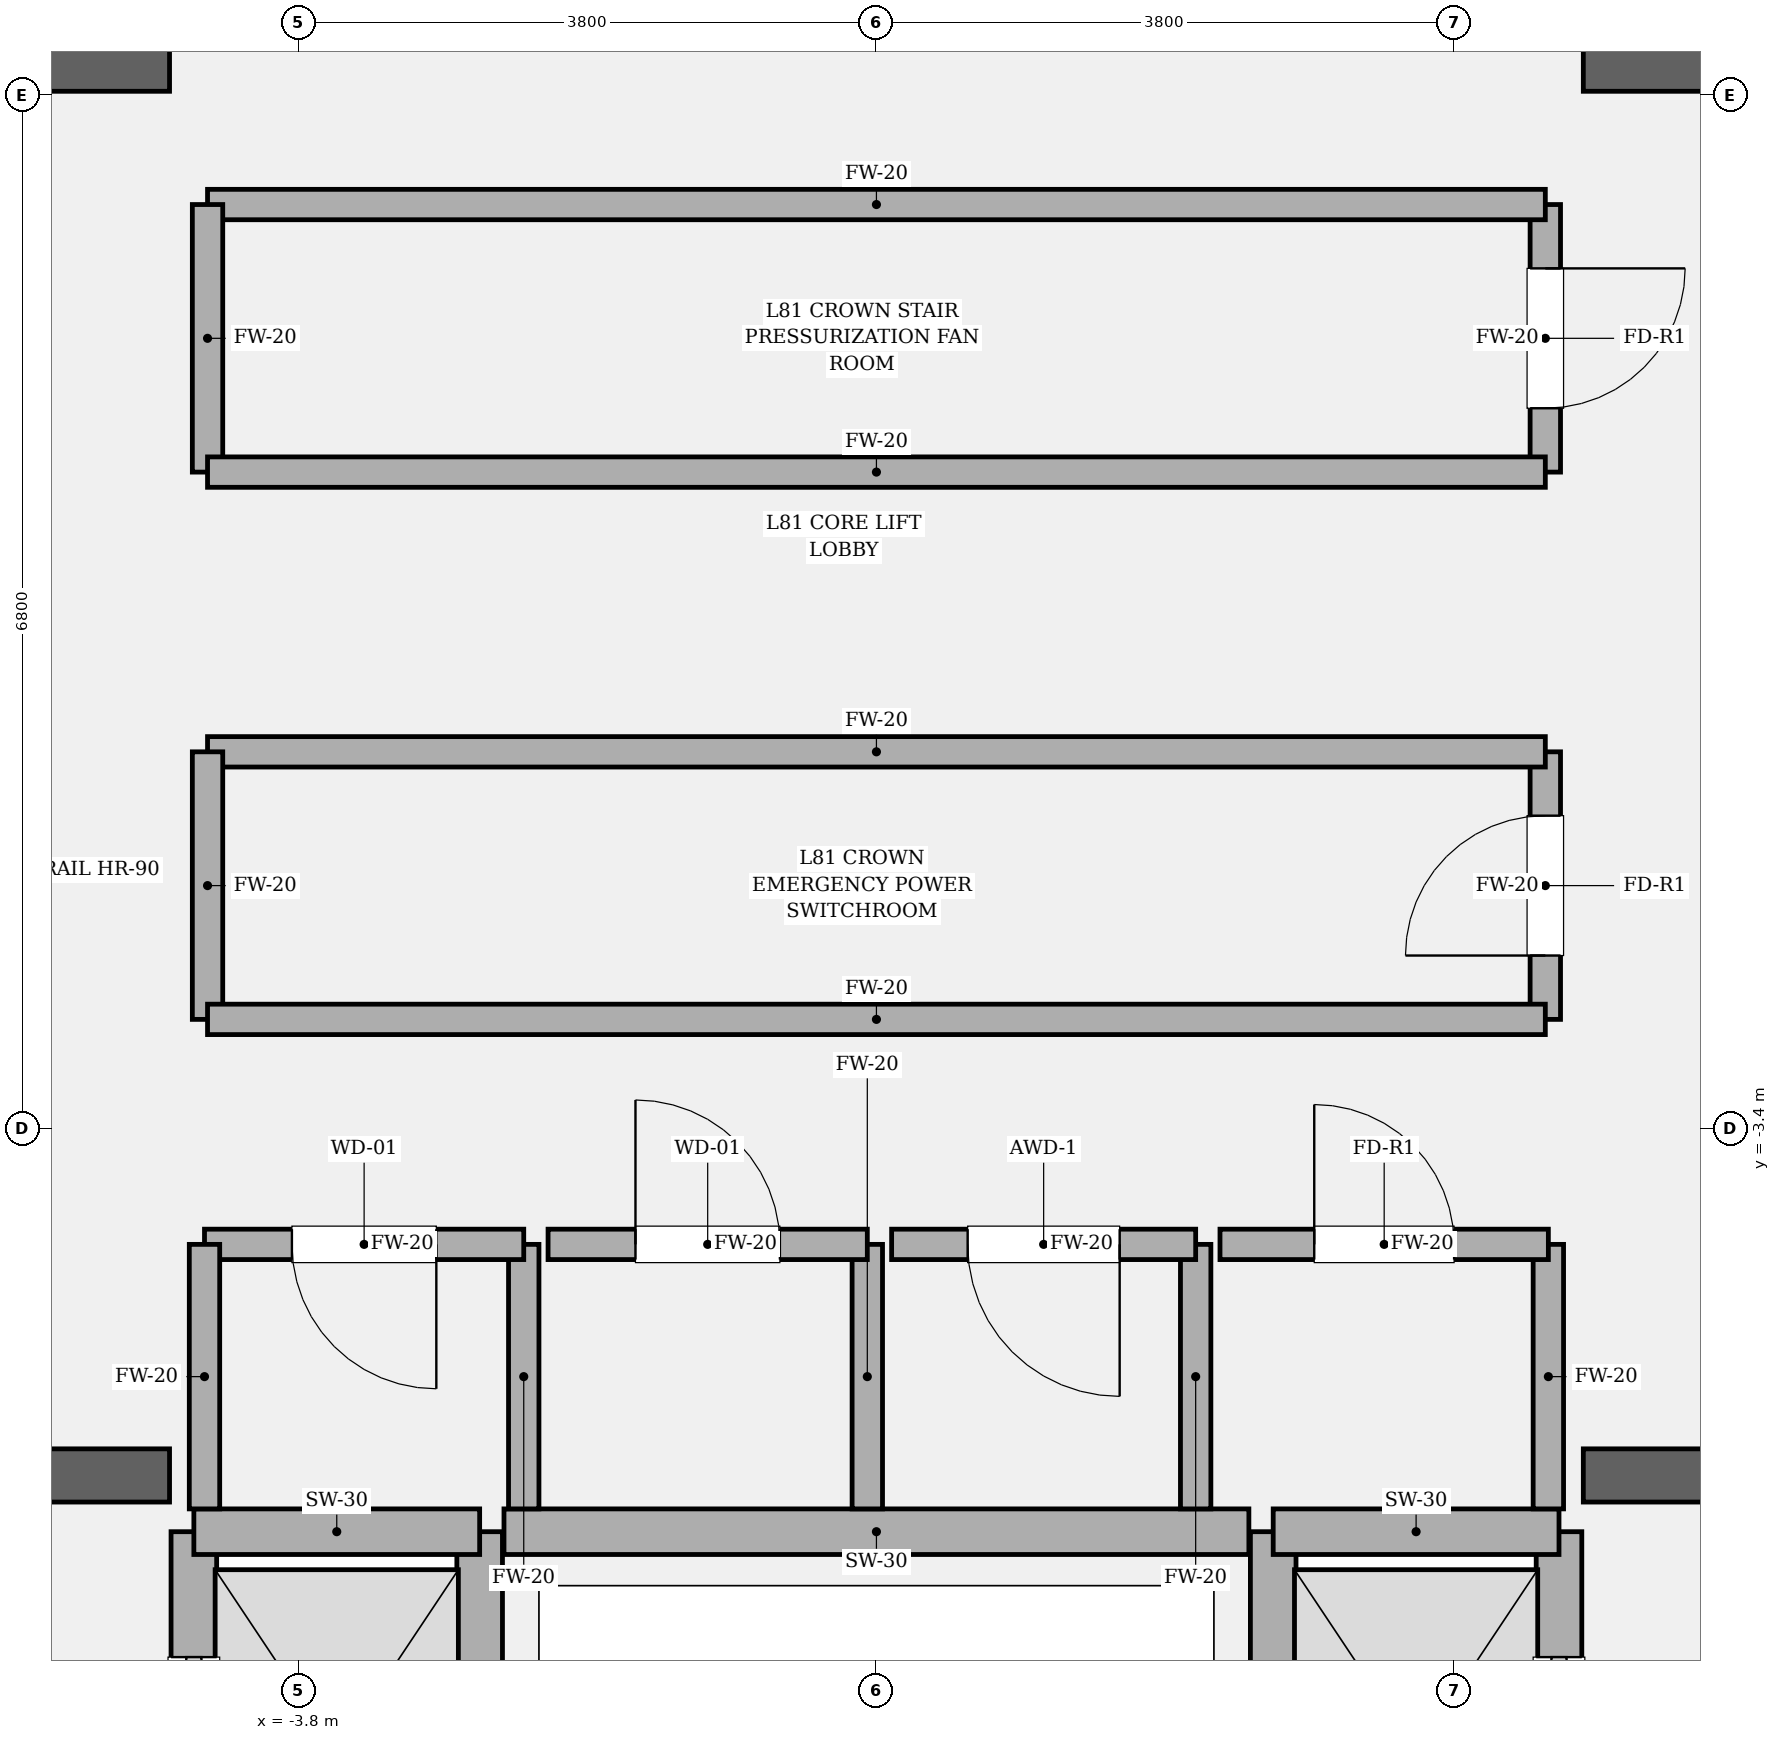
"""IFC4 building model, lengths in metres.
Left out: names, types, materials, properties, quantities, classifications, styles, units other than length and angle.
Written with IfcOpenShell. Run it as: python <this file> out.ifc"""

import sys

from ifc_helpers import new_model, si_unit, direction, frame, frame_2d, origin, place, context, subcontext, project, spatial, rectangle, extrude, element, fill, save


model = new_model("IFC4")
c1 = context("Model", 3, precision=1e-05, world=origin(), true_north=direction((0.0, 1.0)))
c2 = subcontext(c1, "Body", "Model", "MODEL_VIEW")
j1 = project(units=[si_unit("LENGTHUNIT", "METRE"), si_unit("PLANEANGLEUNIT", "RADIAN")], contexts=[c1])
p1 = place(None, origin())
s1 = spatial("IfcSite", under=j1, at=p1, CompositionType="ELEMENT")
p2 = place(p1, origin())
s2 = spatial("IfcBuilding", under=s1, at=p2, CompositionType="ELEMENT")
p3 = place(p2, frame((0.0, 0.0, 343.8)))
s3 = spatial("IfcBuildingStorey", under=s2, at=p3, CompositionType="ELEMENT", Elevation=343.8)
p4 = place(p3, frame((-9.975, -5.68, 0.0), z_axis=(0.0, 0.0, 1.0), x_axis=(1.0, 0.0, 0.0)))
e1 = element("IfcWall", 1, at=p4, inside=s3, PredefinedType="SOLIDWALL", context=c2, shape_type="SweptSolid", body=[
    extrude(rectangle(XDim=5.325, YDim=0.35, at=frame_2d((2.663, 0.0))), origin(), (0.0, 0.0, 1.0), 4.5),
])
p5 = place(p4, frame((1.435, 0.0, 0.0)))
e2 = element("IfcOpeningElement", 2, at=p5, cuts=e1, PredefinedType="OPENING", context=c2, shape_type="SweptSolid", body=[
    extrude(rectangle(XDim=1.18, YDim=2.2, at=frame_2d((0.59, 1.1))), frame((0.0, 0.185, 0.0), z_axis=(0.0, -1.0, 0.0), x_axis=(1.0, 0.0, 0.0)), (0.0, 0.0, 1.0), 0.37),
])
p6 = place(p3, frame((4.65, -5.68, 0.0), z_axis=(0.0, 0.0, 1.0), x_axis=(1.0, 0.0, 0.0)))
e3 = element("IfcWall", 3, at=p6, inside=s3, PredefinedType="SOLIDWALL", context=c2, shape_type="SweptSolid", body=[
    extrude(rectangle(XDim=5.325, YDim=0.35, at=frame_2d((2.663, 0.0))), origin(), (0.0, 0.0, 1.0), 4.5),
])
p7 = place(p6, frame((2.71, 0.0, 0.0)))
e4 = element("IfcOpeningElement", 4, at=p7, cuts=e3, PredefinedType="OPENING", context=c2, shape_type="SweptSolid", body=[
    extrude(rectangle(XDim=1.18, YDim=2.2, at=frame_2d((0.59, 1.1))), frame((0.0, 0.185, 0.0), z_axis=(0.0, -1.0, 0.0), x_axis=(1.0, 0.0, 0.0)), (0.0, 0.0, 1.0), 0.37),
])
for number, where, z_axis, x_axis in (
    (5, (-9.975, 3.6, 0.0), (0.0, 0.0, 1.0), (1.0, 0.0, 0.0)),
    (6, (4.65, 3.6, 0.0), (0.0, 0.0, 1.0), (1.0, 0.0, 0.0)),
):
    element("IfcWall", number, at=place(p3, frame(where, z_axis=z_axis, x_axis=x_axis)), inside=s3, PredefinedType="SOLIDWALL", context=c2, shape_type="SweptSolid", body=[
        extrude(rectangle(XDim=5.325, YDim=0.35, at=frame_2d((2.663, 0.0))), origin(), (0.0, 0.0, 1.0), 4.5),
    ])
p8 = place(p3, frame((-4.49, -8.82, 0.0), z_axis=(0.0, 0.0, 1.0), x_axis=(0.0, 1.0, 0.0)))
e7 = element("IfcWall", 7, at=p8, inside=s3, PredefinedType="SOLIDWALL", context=c2, shape_type="SweptSolid", body=[
    extrude(rectangle(XDim=2.77, YDim=0.3, at=frame_2d((1.385, 0.0))), origin(), (0.0, 0.0, 1.0), 4.28),
])
p9 = place(p8, frame((0.825, 0.0, 0.0)))
e8 = element("IfcOpeningElement", 8, at=p9, cuts=e7, PredefinedType="OPENING", context=c2, shape_type="SweptSolid", body=[
    extrude(rectangle(XDim=1.12, YDim=2.25, at=frame_2d((0.56, 1.125))), frame((0.0, 0.16, 0.0), z_axis=(0.0, -1.0, 0.0), x_axis=(1.0, 0.0, 0.0)), (0.0, 0.0, 1.0), 0.32),
])
p10 = place(p3, frame((-2.61, -8.82, 0.0), z_axis=(0.0, 0.0, 1.0), x_axis=(0.0, 1.0, 0.0)))
e9 = element("IfcWall", 9, at=p10, inside=s3, PredefinedType="SOLIDWALL", context=c2, shape_type="SweptSolid", body=[
    extrude(rectangle(XDim=2.77, YDim=0.3, at=frame_2d((1.385, 0.0))), origin(), (0.0, 0.0, 1.0), 4.28),
])
p11 = place(p3, frame((-4.49, -6.05, 0.0), z_axis=(0.0, 0.0, 1.0), x_axis=(1.0, 0.0, 0.0)))
e10 = element("IfcWall", 10, at=p11, inside=s3, PredefinedType="SOLIDWALL", context=c2, shape_type="SweptSolid", body=[
    extrude(rectangle(XDim=1.88, YDim=0.3, at=frame_2d((0.94, 0.0))), origin(), (0.0, 0.0, 1.0), 4.28),
])
p12 = place(p3, frame((4.49, -8.82, 0.0), z_axis=(0.0, 0.0, 1.0), x_axis=(0.0, 1.0, 0.0)))
e11 = element("IfcWall", 11, at=p12, inside=s3, PredefinedType="SOLIDWALL", context=c2, shape_type="SweptSolid", body=[
    extrude(rectangle(XDim=2.77, YDim=0.3, at=frame_2d((1.385, 0.0))), origin(), (0.0, 0.0, 1.0), 4.28),
])
p13 = place(p12, frame((0.825, 0.0, 0.0)))
e12 = element("IfcOpeningElement", 12, at=p13, cuts=e11, PredefinedType="OPENING", context=c2, shape_type="SweptSolid", body=[
    extrude(rectangle(XDim=1.12, YDim=2.25, at=frame_2d((0.56, 1.125))), frame((0.0, 0.16, 0.0), z_axis=(0.0, -1.0, 0.0), x_axis=(1.0, 0.0, 0.0)), (0.0, 0.0, 1.0), 0.32),
])
p14 = place(p3, frame((2.61, -8.82, 0.0), z_axis=(0.0, 0.0, 1.0), x_axis=(0.0, 1.0, 0.0)))
e13 = element("IfcWall", 13, at=p14, inside=s3, PredefinedType="SOLIDWALL", context=c2, shape_type="SweptSolid", body=[
    extrude(rectangle(XDim=2.77, YDim=0.3, at=frame_2d((1.385, 0.0))), origin(), (0.0, 0.0, 1.0), 4.28),
])
p15 = place(p3, frame((2.61, -6.05, 0.0), z_axis=(0.0, 0.0, 1.0), x_axis=(1.0, 0.0, 0.0)))
e14 = element("IfcWall", 14, at=p15, inside=s3, PredefinedType="SOLIDWALL", context=c2, shape_type="SweptSolid", body=[
    extrude(rectangle(XDim=1.88, YDim=0.3, at=frame_2d((0.94, 0.0))), origin(), (0.0, 0.0, 1.0), 4.28),
])
p16 = place(p3, frame((-2.45, -6.05, 0.0), z_axis=(0.0, 0.0, 1.0), x_axis=(1.0, 0.0, 0.0)))
e15 = element("IfcWall", 15, at=p16, inside=s3, PredefinedType="SOLIDWALL", context=c2, shape_type="SweptSolid", body=[
    extrude(rectangle(XDim=4.9, YDim=0.3, at=frame_2d((2.45, 0.0))), origin(), (0.0, 0.0, 1.0), 4.28),
])
p17 = place(p3, frame((-2.32, -5.9, 0.0), z_axis=(0.0, 0.0, 1.0), x_axis=(0.0, 1.0, 0.0)))
e16 = element("IfcWall", 16, at=p17, inside=s3, PredefinedType="SOLIDWALL", context=c2, shape_type="SweptSolid", body=[
    extrude(rectangle(XDim=1.74, YDim=0.2, at=frame_2d((0.87, 0.0))), origin(), (0.0, 0.0, 1.0), 4.28),
])
p18 = place(p3, frame((-2.32, -4.16, 0.0), z_axis=(0.0, 0.0, 1.0), x_axis=(-1.0, 0.0, 0.0)))
e17 = element("IfcWall", 17, at=p18, inside=s3, PredefinedType="SOLIDWALL", context=c2, shape_type="SweptSolid", body=[
    extrude(rectangle(XDim=2.1, YDim=0.2, at=frame_2d((1.05, 0.0))), origin(), (0.0, 0.0, 1.0), 4.28),
])
p19 = place(p18, frame((0.575, 0.0, 0.0)))
e18 = element("IfcOpeningElement", 18, at=p19, cuts=e17, PredefinedType="OPENING", context=c2, shape_type="SweptSolid", body=[
    extrude(rectangle(XDim=0.95, YDim=2.15, at=frame_2d((0.475, 1.075))), frame((0.0, 0.11, 0.0), z_axis=(0.0, -1.0, 0.0), x_axis=(1.0, 0.0, 0.0)), (0.0, 0.0, 1.0), 0.22),
])
for number, where, z_axis, x_axis in (
    (19, (-4.42, -4.16, 0.0), (0.0, 0.0, 1.0), (0.0, -1.0, 0.0)),
    (20, (-0.06, -5.9, 0.0), (0.0, 0.0, 1.0), (0.0, 1.0, 0.0)),
):
    element("IfcWall", number, at=place(p3, frame(where, z_axis=z_axis, x_axis=x_axis)), inside=s3, PredefinedType="SOLIDWALL", context=c2, shape_type="SweptSolid", body=[
        extrude(rectangle(XDim=1.74, YDim=0.2, at=frame_2d((0.87, 0.0))), origin(), (0.0, 0.0, 1.0), 4.28),
    ])
p20 = place(p3, frame((-0.06, -4.16, 0.0), z_axis=(0.0, 0.0, 1.0), x_axis=(-1.0, 0.0, 0.0)))
e21 = element("IfcWall", 21, at=p20, inside=s3, PredefinedType="SOLIDWALL", context=c2, shape_type="SweptSolid", body=[
    extrude(rectangle(XDim=2.1, YDim=0.2, at=frame_2d((1.05, 0.0))), origin(), (0.0, 0.0, 1.0), 4.28),
])
p21 = place(p20, frame((0.575, 0.0, 0.0)))
e22 = element("IfcOpeningElement", 22, at=p21, cuts=e21, PredefinedType="OPENING", context=c2, shape_type="SweptSolid", body=[
    extrude(rectangle(XDim=0.95, YDim=2.15, at=frame_2d((0.475, 1.075))), frame((0.0, 0.11, 0.0), z_axis=(0.0, -1.0, 0.0), x_axis=(1.0, 0.0, 0.0)), (0.0, 0.0, 1.0), 0.22),
])
p22 = place(p3, frame((2.1, -5.9, 0.0), z_axis=(0.0, 0.0, 1.0), x_axis=(0.0, 1.0, 0.0)))
e23 = element("IfcWall", 23, at=p22, inside=s3, PredefinedType="SOLIDWALL", context=c2, shape_type="SweptSolid", body=[
    extrude(rectangle(XDim=1.74, YDim=0.2, at=frame_2d((0.87, 0.0))), origin(), (0.0, 0.0, 1.0), 4.28),
])
p23 = place(p3, frame((2.1, -4.16, 0.0), z_axis=(0.0, 0.0, 1.0), x_axis=(-1.0, 0.0, 0.0)))
e24 = element("IfcWall", 24, at=p23, inside=s3, PredefinedType="SOLIDWALL", context=c2, shape_type="SweptSolid", body=[
    extrude(rectangle(XDim=2.0, YDim=0.2, at=frame_2d((1.0, 0.0))), origin(), (0.0, 0.0, 1.0), 4.28),
])
p24 = place(p23, frame((0.5, 0.0, 0.0)))
e25 = element("IfcOpeningElement", 25, at=p24, cuts=e24, PredefinedType="OPENING", context=c2, shape_type="SweptSolid", body=[
    extrude(rectangle(XDim=1.0, YDim=2.15, at=frame_2d((0.5, 1.075))), frame((0.0, 0.11, 0.0), z_axis=(0.0, -1.0, 0.0), x_axis=(1.0, 0.0, 0.0)), (0.0, 0.0, 1.0), 0.22),
])
p25 = place(p3, frame((4.42, -5.9, 0.0), z_axis=(0.0, 0.0, 1.0), x_axis=(0.0, 1.0, 0.0)))
e26 = element("IfcWall", 26, at=p25, inside=s3, PredefinedType="SOLIDWALL", context=c2, shape_type="SweptSolid", body=[
    extrude(rectangle(XDim=1.74, YDim=0.2, at=frame_2d((0.87, 0.0))), origin(), (0.0, 0.0, 1.0), 4.28),
])
p26 = place(p3, frame((4.42, -4.16, 0.0), z_axis=(0.0, 0.0, 1.0), x_axis=(-1.0, 0.0, 0.0)))
e27 = element("IfcWall", 27, at=p26, inside=s3, PredefinedType="SOLIDWALL", context=c2, shape_type="SweptSolid", body=[
    extrude(rectangle(XDim=2.16, YDim=0.2, at=frame_2d((1.08, 0.0))), origin(), (0.0, 0.0, 1.0), 4.28),
])
p27 = place(p26, frame((0.62, 0.0, 0.0)))
e28 = element("IfcOpeningElement", 28, at=p27, cuts=e27, PredefinedType="OPENING", context=c2, shape_type="SweptSolid", body=[
    extrude(rectangle(XDim=0.92, YDim=2.1, at=frame_2d((0.46, 1.05))), frame((0.0, 0.11, 0.0), z_axis=(0.0, -1.0, 0.0), x_axis=(1.0, 0.0, 0.0)), (0.0, 0.0, 1.0), 0.22),
])
p28 = place(p3, frame((4.4, -2.68, 0.0), z_axis=(0.0, 0.0, 1.0), x_axis=(0.0, 1.0, 0.0)))
e29 = element("IfcWall", 29, at=p28, inside=s3, PredefinedType="SOLIDWALL", context=c2, shape_type="SweptSolid", body=[
    extrude(rectangle(XDim=1.76, YDim=0.2, at=frame_2d((0.88, 0.0))), origin(), (0.0, 0.0, 1.0), 4.28),
])
p29 = place(p28, frame((0.42, 0.0, 0.0)))
e30 = element("IfcOpeningElement", 30, at=p29, cuts=e29, PredefinedType="OPENING", context=c2, shape_type="SweptSolid", body=[
    extrude(rectangle(XDim=0.92, YDim=2.1, at=frame_2d((0.46, 1.05))), frame((0.0, 0.11, 0.0), z_axis=(0.0, -1.0, 0.0), x_axis=(1.0, 0.0, 0.0)), (0.0, 0.0, 1.0), 0.22),
])
p30 = place(p3, frame((4.4, -0.92, 0.0), z_axis=(0.0, 0.0, 1.0), x_axis=(-1.0, 0.0, 0.0)))
e31 = element("IfcWall", 31, at=p30, inside=s3, PredefinedType="SOLIDWALL", context=c2, shape_type="SweptSolid", body=[
    extrude(rectangle(XDim=8.8, YDim=0.2, at=frame_2d((4.4, 0.0))), origin(), (0.0, 0.0, 1.0), 4.28),
])
p31 = place(p3, frame((-4.4, -0.92, 0.0), z_axis=(0.0, 0.0, 1.0), x_axis=(0.0, -1.0, 0.0)))
e32 = element("IfcWall", 32, at=p31, inside=s3, PredefinedType="SOLIDWALL", context=c2, shape_type="SweptSolid", body=[
    extrude(rectangle(XDim=1.76, YDim=0.2, at=frame_2d((0.88, 0.0))), origin(), (0.0, 0.0, 1.0), 4.28),
])
p32 = place(p3, frame((-4.4, -2.68, 0.0), z_axis=(0.0, 0.0, 1.0), x_axis=(1.0, 0.0, 0.0)))
e33 = element("IfcWall", 33, at=p32, inside=s3, PredefinedType="SOLIDWALL", context=c2, shape_type="SweptSolid", body=[
    extrude(rectangle(XDim=8.8, YDim=0.2, at=frame_2d((4.4, 0.0))), origin(), (0.0, 0.0, 1.0), 4.28),
])
p33 = place(p3, frame((4.4, 0.92, 0.0), z_axis=(0.0, 0.0, 1.0), x_axis=(0.0, 1.0, 0.0)))
e34 = element("IfcWall", 34, at=p33, inside=s3, PredefinedType="SOLIDWALL", context=c2, shape_type="SweptSolid", body=[
    extrude(rectangle(XDim=1.76, YDim=0.2, at=frame_2d((0.88, 0.0))), origin(), (0.0, 0.0, 1.0), 4.28),
])
p34 = place(p33, frame((0.42, 0.0, 0.0)))
e35 = element("IfcOpeningElement", 35, at=p34, cuts=e34, PredefinedType="OPENING", context=c2, shape_type="SweptSolid", body=[
    extrude(rectangle(XDim=0.92, YDim=2.1, at=frame_2d((0.46, 1.05))), frame((0.0, 0.11, 0.0), z_axis=(0.0, -1.0, 0.0), x_axis=(1.0, 0.0, 0.0)), (0.0, 0.0, 1.0), 0.22),
])
p35 = place(p3, frame((4.4, 2.68, 0.0), z_axis=(0.0, 0.0, 1.0), x_axis=(-1.0, 0.0, 0.0)))
e36 = element("IfcWall", 36, at=p35, inside=s3, PredefinedType="SOLIDWALL", context=c2, shape_type="SweptSolid", body=[
    extrude(rectangle(XDim=8.8, YDim=0.2, at=frame_2d((4.4, 0.0))), origin(), (0.0, 0.0, 1.0), 4.28),
])
p36 = place(p3, frame((-4.4, 2.68, 0.0), z_axis=(0.0, 0.0, 1.0), x_axis=(0.0, -1.0, 0.0)))
e37 = element("IfcWall", 37, at=p36, inside=s3, PredefinedType="SOLIDWALL", context=c2, shape_type="SweptSolid", body=[
    extrude(rectangle(XDim=1.76, YDim=0.2, at=frame_2d((0.88, 0.0))), origin(), (0.0, 0.0, 1.0), 4.28),
])
p37 = place(p3, frame((-4.4, 0.92, 0.0), z_axis=(0.0, 0.0, 1.0), x_axis=(1.0, 0.0, 0.0)))
e38 = element("IfcWall", 38, at=p37, inside=s3, PredefinedType="SOLIDWALL", context=c2, shape_type="SweptSolid", body=[
    extrude(rectangle(XDim=8.8, YDim=0.2, at=frame_2d((4.4, 0.0))), origin(), (0.0, 0.0, 1.0), 4.28),
])
p38 = place(p9, origin())
e39 = element("IfcDoor", 39, at=p38, inside=s3, OperationType="SLIDING_TO_LEFT", PredefinedType="DOOR", context=c2, shape_type="SweptSolid", body=[
    extrude(rectangle(XDim=1.12, YDim=2.25, at=frame_2d((0.56, 1.125))), frame((0.0, 0.025, 0.0), z_axis=(0.0, -1.0, 0.0), x_axis=(1.0, 0.0, 0.0)), (0.0, 0.0, 1.0), 0.05),
])
fill(e8, e39)
p39 = place(p13, origin())
e40 = element("IfcDoor", 40, at=p39, inside=s3, OperationType="SLIDING_TO_RIGHT", PredefinedType="DOOR", context=c2, shape_type="SweptSolid", body=[
    extrude(rectangle(XDim=1.12, YDim=2.25, at=frame_2d((0.56, 1.125))), frame((0.0, 0.025, 0.0), z_axis=(0.0, -1.0, 0.0), x_axis=(1.0, 0.0, 0.0)), (0.0, 0.0, 1.0), 0.05),
])
fill(e12, e40)
p40 = place(p19, origin())
e41 = element("IfcDoor", 41, at=p40, inside=s3, OperationType="SINGLE_SWING_LEFT", PredefinedType="DOOR", context=c2, shape_type="SweptSolid", body=[
    extrude(rectangle(XDim=0.95, YDim=2.15, at=frame_2d((0.475, 1.075))), frame((0.0, 0.025, 0.0), z_axis=(0.0, -1.0, 0.0), x_axis=(1.0, 0.0, 0.0)), (0.0, 0.0, 1.0), 0.05),
])
fill(e18, e41)
p41 = place(p21, origin())
e42 = element("IfcDoor", 42, at=p41, inside=s3, OperationType="SINGLE_SWING_RIGHT", PredefinedType="DOOR", context=c2, shape_type="SweptSolid", body=[
    extrude(rectangle(XDim=0.95, YDim=2.15, at=frame_2d((0.475, 1.075))), frame((0.0, 0.025, 0.0), z_axis=(0.0, -1.0, 0.0), x_axis=(1.0, 0.0, 0.0)), (0.0, 0.0, 1.0), 0.05),
])
fill(e22, e42)
p42 = place(p24, origin())
e43 = element("IfcDoor", 43, at=p42, inside=s3, OperationType="SINGLE_SWING_LEFT", PredefinedType="DOOR", context=c2, shape_type="SweptSolid", body=[
    extrude(rectangle(XDim=1.0, YDim=2.15, at=frame_2d((0.5, 1.075))), frame((0.0, 0.025, 0.0), z_axis=(0.0, -1.0, 0.0), x_axis=(1.0, 0.0, 0.0)), (0.0, 0.0, 1.0), 0.05),
])
fill(e25, e43)
p43 = place(p27, origin())
e44 = element("IfcDoor", 44, at=p43, inside=s3, OperationType="SINGLE_SWING_RIGHT", PredefinedType="DOOR", context=c2, shape_type="SweptSolid", body=[
    extrude(rectangle(XDim=0.92, YDim=2.1, at=frame_2d((0.46, 1.05))), frame((0.0, 0.025, 0.0), z_axis=(0.0, -1.0, 0.0), x_axis=(1.0, 0.0, 0.0)), (0.0, 0.0, 1.0), 0.05),
])
fill(e28, e44)
p44 = place(p29, origin())
e45 = element("IfcDoor", 45, at=p44, inside=s3, OperationType="SINGLE_SWING_LEFT", PredefinedType="DOOR", context=c2, shape_type="SweptSolid", body=[
    extrude(rectangle(XDim=0.92, YDim=2.1, at=frame_2d((0.46, 1.05))), frame((0.0, 0.025, 0.0), z_axis=(0.0, -1.0, 0.0), x_axis=(1.0, 0.0, 0.0)), (0.0, 0.0, 1.0), 0.05),
])
fill(e30, e45)
p45 = place(p34, origin())
e46 = element("IfcDoor", 46, at=p45, inside=s3, OperationType="SINGLE_SWING_RIGHT", PredefinedType="DOOR", context=c2, shape_type="SweptSolid", body=[
    extrude(rectangle(XDim=0.92, YDim=2.1, at=frame_2d((0.46, 1.05))), frame((0.0, 0.025, 0.0), z_axis=(0.0, -1.0, 0.0), x_axis=(1.0, 0.0, 0.0)), (0.0, 0.0, 1.0), 0.05),
])
fill(e35, e46)
save(model, sys.argv[1])
